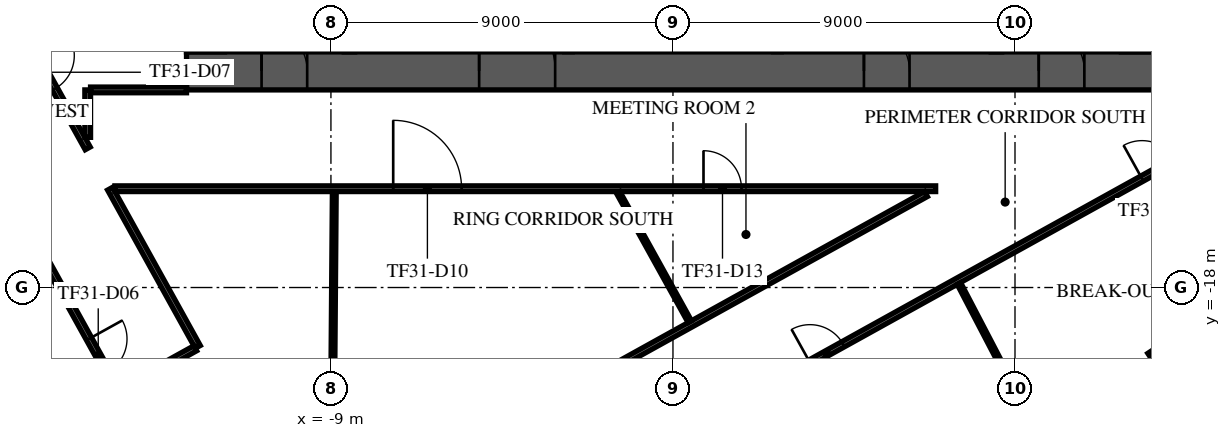
"""IFC4 building model, lengths in metres.
Left out: names, types, materials, properties, quantities, classifications, styles, units other than length and angle.
Written with IfcOpenShell. Run it as: python <this file> out.ifc"""

import sys

from ifc_helpers import new_model, si_unit, direction, frame, frame_2d, origin, origin_2d, place, context, subcontext, project, spatial, rectangle, extrude, element, fill, save


model = new_model("IFC4")
c1 = context("Model", 3, precision=1e-05, world=origin(), true_north=direction((0.0, 1.0)))
c2 = subcontext(c1, "Body", "Model", "MODEL_VIEW")
j1 = project(units=[si_unit("LENGTHUNIT", "METRE"), si_unit("PLANEANGLEUNIT", "RADIAN")], contexts=[c1])
p1 = place(None, origin())
s1 = spatial("IfcSite", under=j1, at=p1, CompositionType="ELEMENT")
p2 = place(p1, origin())
s2 = spatial("IfcBuilding", under=s1, at=p2, CompositionType="ELEMENT")
p3 = place(p2, frame((0.0, 0.0, 135.7)))
s3 = spatial("IfcBuildingStorey", under=s2, at=p3, CompositionType="ELEMENT", Elevation=135.7)
p4 = place(p3, frame((13.258, -19.885, -0.4), z_axis=(0.0, 0.0, 1.0), x_axis=(0.832028680356, 0.55473261583, 0.0)))
e1 = element("IfcColumn", 1, at=p4, inside=s3, PredefinedType="COLUMN", context=c2, shape_type="SweptSolid", body=[
    extrude(rectangle(XDim=1.1, YDim=1.1, at=origin_2d()), origin(), (0.0, 0.0, 1.0), 4.4),
])
p5 = place(p3, frame((-12.8, -12.3, 0.0), z_axis=(0.0, 0.0, 1.0), x_axis=(1.0, 0.0, 0.0)))
e2 = element("IfcWall", 2, at=p5, inside=s3, PredefinedType="SHEAR", context=c2, shape_type="SweptSolid", body=[
    extrude(rectangle(XDim=25.6, YDim=1.0, at=frame_2d((12.8, 0.0))), origin(), (0.0, 0.0, 1.0), 3.6),
])
p6 = place(p5, frame((7.7, 0.0, 0.0)))
e3 = element("IfcOpeningElement", 3, at=p6, cuts=e2, PredefinedType="OPENING", context=c2, shape_type="SweptSolid", body=[
    extrude(rectangle(XDim=2.0, YDim=2.1, at=frame_2d((1.0, 1.05))), frame((0.0, 0.51, 0.0), z_axis=(0.0, -1.0, 0.0), x_axis=(1.0, 0.0, 0.0)), (0.0, 0.0, 1.0), 1.02),
])
p7 = place(p5, frame((17.825, 0.0, 0.0)))
e4 = element("IfcOpeningElement", 4, at=p7, cuts=e2, PredefinedType="OPENING", context=c2, shape_type="SweptSolid", body=[
    extrude(rectangle(XDim=1.2, YDim=2.1, at=frame_2d((0.6, 1.05))), frame((0.0, 0.51, 0.0), z_axis=(0.0, -1.0, 0.0), x_axis=(1.0, 0.0, 0.0)), (0.0, 0.0, 1.0), 1.02),
])
p8 = place(p5, frame((1.975, 0.0, 0.0)))
e5 = element("IfcOpeningElement", 5, at=p8, cuts=e2, PredefinedType="OPENING", context=c2, shape_type="SweptSolid", body=[
    extrude(rectangle(XDim=1.2, YDim=2.1, at=frame_2d((0.6, 1.05))), frame((0.0, 0.51, 0.0), z_axis=(0.0, -1.0, 0.0), x_axis=(1.0, 0.0, 0.0)), (0.0, 0.0, 1.0), 1.02),
])
p9 = place(p5, frame((22.425, 0.0, 0.0)))
e6 = element("IfcOpeningElement", 6, at=p9, cuts=e2, PredefinedType="OPENING", context=c2, shape_type="SweptSolid", body=[
    extrude(rectangle(XDim=1.2, YDim=2.1, at=frame_2d((0.6, 1.05))), frame((0.0, 0.51, 0.0), z_axis=(0.0, -1.0, 0.0), x_axis=(1.0, 0.0, 0.0)), (0.0, 0.0, 1.0), 1.02),
])
p10 = place(p3, frame((-36.291, 4.209, 0.0), z_axis=(0.0, 0.0, 1.0), x_axis=(0.484810659622, -0.874619131003, 0.0)))
e7 = element("IfcWall", 7, at=p10, inside=s3, PredefinedType="STANDARD", context=c2, shape_type="SweptSolid", body=[
    extrude(rectangle(XDim=42.552, YDim=0.6, at=frame_2d((21.276, 0.0))), origin(), (0.0, 0.0, 1.0), 3.6),
])
p11 = place(p10, frame((1.178, 0.0, 0.9)))
e8 = element("IfcOpeningElement", 8, at=p11, cuts=e7, PredefinedType="OPENING", context=c2, shape_type="SweptSolid", body=[
    extrude(rectangle(XDim=1.8, YDim=2.1, at=frame_2d((0.9, 1.05))), frame((0.0, 0.31, 0.0), z_axis=(0.0, -1.0, 0.0), x_axis=(1.0, 0.0, 0.0)), (0.0, 0.0, 1.0), 0.62),
])
p12 = place(p10, frame((5.396, 0.0, 0.9)))
e9 = element("IfcOpeningElement", 9, at=p12, cuts=e7, PredefinedType="OPENING", context=c2, shape_type="SweptSolid", body=[
    extrude(rectangle(XDim=1.8, YDim=2.1, at=frame_2d((0.9, 1.05))), frame((0.0, 0.31, 0.0), z_axis=(0.0, -1.0, 0.0), x_axis=(1.0, 0.0, 0.0)), (0.0, 0.0, 1.0), 0.62),
])
p13 = place(p10, frame((13.956, 0.0, 0.9)))
e10 = element("IfcOpeningElement", 10, at=p13, cuts=e7, PredefinedType="OPENING", context=c2, shape_type="SweptSolid", body=[
    extrude(rectangle(XDim=1.8, YDim=2.1, at=frame_2d((0.9, 1.05))), frame((0.0, 0.31, 0.0), z_axis=(0.0, -1.0, 0.0), x_axis=(1.0, 0.0, 0.0)), (0.0, 0.0, 1.0), 0.62),
])
p14 = place(p10, frame((18.236, 0.0, 0.9)))
e11 = element("IfcOpeningElement", 11, at=p14, cuts=e7, PredefinedType="OPENING", context=c2, shape_type="SweptSolid", body=[
    extrude(rectangle(XDim=1.8, YDim=2.1, at=frame_2d((0.9, 1.05))), frame((0.0, 0.31, 0.0), z_axis=(0.0, -1.0, 0.0), x_axis=(1.0, 0.0, 0.0)), (0.0, 0.0, 1.0), 0.62),
])
p15 = place(p10, frame((22.516, 0.0, 0.9)))
e12 = element("IfcOpeningElement", 12, at=p15, cuts=e7, PredefinedType="OPENING", context=c2, shape_type="SweptSolid", body=[
    extrude(rectangle(XDim=1.8, YDim=2.1, at=frame_2d((0.9, 1.05))), frame((0.0, 0.31, 0.0), z_axis=(0.0, -1.0, 0.0), x_axis=(1.0, 0.0, 0.0)), (0.0, 0.0, 1.0), 0.62),
])
p16 = place(p10, frame((26.796, 0.0, 0.9)))
e13 = element("IfcOpeningElement", 13, at=p16, cuts=e7, PredefinedType="OPENING", context=c2, shape_type="SweptSolid", body=[
    extrude(rectangle(XDim=1.8, YDim=2.1, at=frame_2d((0.9, 1.05))), frame((0.0, 0.31, 0.0), z_axis=(0.0, -1.0, 0.0), x_axis=(1.0, 0.0, 0.0)), (0.0, 0.0, 1.0), 0.62),
])
p17 = place(p10, frame((31.076, 0.0, 0.9)))
e14 = element("IfcOpeningElement", 14, at=p17, cuts=e7, PredefinedType="OPENING", context=c2, shape_type="SweptSolid", body=[
    extrude(rectangle(XDim=1.8, YDim=2.1, at=frame_2d((0.9, 1.05))), frame((0.0, 0.31, 0.0), z_axis=(0.0, -1.0, 0.0), x_axis=(1.0, 0.0, 0.0)), (0.0, 0.0, 1.0), 0.62),
])
p18 = place(p10, frame((35.356, 0.0, 0.9)))
e15 = element("IfcOpeningElement", 15, at=p18, cuts=e7, PredefinedType="OPENING", context=c2, shape_type="SweptSolid", body=[
    extrude(rectangle(XDim=1.8, YDim=2.1, at=frame_2d((0.9, 1.05))), frame((0.0, 0.31, 0.0), z_axis=(0.0, -1.0, 0.0), x_axis=(1.0, 0.0, 0.0)), (0.0, 0.0, 1.0), 0.62),
])
p19 = place(p10, frame((39.573, 0.0, 0.9)))
e16 = element("IfcOpeningElement", 16, at=p19, cuts=e7, PredefinedType="OPENING", context=c2, shape_type="SweptSolid", body=[
    extrude(rectangle(XDim=1.8, YDim=2.1, at=frame_2d((0.9, 1.05))), frame((0.0, 0.31, 0.0), z_axis=(0.0, -1.0, 0.0), x_axis=(1.0, 0.0, 0.0)), (0.0, 0.0, 1.0), 0.62),
])
p20 = place(p3, frame((-9.103, -34.888, 0.0), z_axis=(0.0, 0.0, 1.0), x_axis=(0.874618897425, 0.484811081007, 0.0)))
e17 = element("IfcWall", 17, at=p20, inside=s3, PredefinedType="STANDARD", context=c2, shape_type="SweptSolid", body=[
    extrude(rectangle(XDim=49.751, YDim=0.6, at=frame_2d((24.876, 0.0))), origin(), (0.0, 0.0, 1.0), 3.6),
])
p21 = place(p20, frame((1.161, 0.0, 0.9)))
e18 = element("IfcOpeningElement", 18, at=p21, cuts=e17, PredefinedType="OPENING", context=c2, shape_type="SweptSolid", body=[
    extrude(rectangle(XDim=2.1, YDim=2.1, at=frame_2d((1.05, 1.05))), frame((0.0, 0.31, 0.0), z_axis=(0.0, -1.0, 0.0), x_axis=(1.0, 0.0, 0.0)), (0.0, 0.0, 1.0), 0.62),
])
p22 = place(p20, frame((5.644, 0.0, 0.9)))
e19 = element("IfcOpeningElement", 19, at=p22, cuts=e17, PredefinedType="OPENING", context=c2, shape_type="SweptSolid", body=[
    extrude(rectangle(XDim=2.1, YDim=2.1, at=frame_2d((1.05, 1.05))), frame((0.0, 0.31, 0.0), z_axis=(0.0, -1.0, 0.0), x_axis=(1.0, 0.0, 0.0)), (0.0, 0.0, 1.0), 0.62),
])
p23 = place(p20, frame((10.189, 0.0, 0.9)))
e20 = element("IfcOpeningElement", 20, at=p23, cuts=e17, PredefinedType="OPENING", context=c2, shape_type="SweptSolid", body=[
    extrude(rectangle(XDim=2.1, YDim=2.1, at=frame_2d((1.05, 1.05))), frame((0.0, 0.31, 0.0), z_axis=(0.0, -1.0, 0.0), x_axis=(1.0, 0.0, 0.0)), (0.0, 0.0, 1.0), 0.62),
])
p24 = place(p20, frame((14.735, 0.0, 0.9)))
e21 = element("IfcOpeningElement", 21, at=p24, cuts=e17, PredefinedType="OPENING", context=c2, shape_type="SweptSolid", body=[
    extrude(rectangle(XDim=2.1, YDim=2.1, at=frame_2d((1.05, 1.05))), frame((0.0, 0.31, 0.0), z_axis=(0.0, -1.0, 0.0), x_axis=(1.0, 0.0, 0.0)), (0.0, 0.0, 1.0), 0.62),
])
p25 = place(p20, frame((19.28, 0.0, 0.9)))
e22 = element("IfcOpeningElement", 22, at=p25, cuts=e17, PredefinedType="OPENING", context=c2, shape_type="SweptSolid", body=[
    extrude(rectangle(XDim=2.1, YDim=2.1, at=frame_2d((1.05, 1.05))), frame((0.0, 0.31, 0.0), z_axis=(0.0, -1.0, 0.0), x_axis=(1.0, 0.0, 0.0)), (0.0, 0.0, 1.0), 0.62),
])
p26 = place(p20, frame((23.826, 0.0, 0.9)))
e23 = element("IfcOpeningElement", 23, at=p26, cuts=e17, PredefinedType="OPENING", context=c2, shape_type="SweptSolid", body=[
    extrude(rectangle(XDim=2.1, YDim=2.1, at=frame_2d((1.05, 1.05))), frame((0.0, 0.31, 0.0), z_axis=(0.0, -1.0, 0.0), x_axis=(1.0, 0.0, 0.0)), (0.0, 0.0, 1.0), 0.62),
])
p27 = place(p20, frame((28.371, 0.0, 0.9)))
e24 = element("IfcOpeningElement", 24, at=p27, cuts=e17, PredefinedType="OPENING", context=c2, shape_type="SweptSolid", body=[
    extrude(rectangle(XDim=2.1, YDim=2.1, at=frame_2d((1.05, 1.05))), frame((0.0, 0.31, 0.0), z_axis=(0.0, -1.0, 0.0), x_axis=(1.0, 0.0, 0.0)), (0.0, 0.0, 1.0), 0.62),
])
p28 = place(p20, frame((32.917, 0.0, 0.9)))
e25 = element("IfcOpeningElement", 25, at=p28, cuts=e17, PredefinedType="OPENING", context=c2, shape_type="SweptSolid", body=[
    extrude(rectangle(XDim=2.1, YDim=2.1, at=frame_2d((1.05, 1.05))), frame((0.0, 0.31, 0.0), z_axis=(0.0, -1.0, 0.0), x_axis=(1.0, 0.0, 0.0)), (0.0, 0.0, 1.0), 0.62),
])
p29 = place(p20, frame((37.462, 0.0, 0.9)))
e26 = element("IfcOpeningElement", 26, at=p29, cuts=e17, PredefinedType="OPENING", context=c2, shape_type="SweptSolid", body=[
    extrude(rectangle(XDim=2.1, YDim=2.1, at=frame_2d((1.05, 1.05))), frame((0.0, 0.31, 0.0), z_axis=(0.0, -1.0, 0.0), x_axis=(1.0, 0.0, 0.0)), (0.0, 0.0, 1.0), 0.62),
])
p30 = place(p20, frame((42.008, 0.0, 0.9)))
e27 = element("IfcOpeningElement", 27, at=p30, cuts=e17, PredefinedType="OPENING", context=c2, shape_type="SweptSolid", body=[
    extrude(rectangle(XDim=2.1, YDim=2.1, at=frame_2d((1.05, 1.05))), frame((0.0, 0.31, 0.0), z_axis=(0.0, -1.0, 0.0), x_axis=(1.0, 0.0, 0.0)), (0.0, 0.0, 1.0), 0.62),
])
p31 = place(p20, frame((46.491, 0.0, 0.9)))
e28 = element("IfcOpeningElement", 28, at=p31, cuts=e17, PredefinedType="OPENING", context=c2, shape_type="SweptSolid", body=[
    extrude(rectangle(XDim=2.1, YDim=2.1, at=frame_2d((1.05, 1.05))), frame((0.0, 0.31, 0.0), z_axis=(0.0, -1.0, 0.0), x_axis=(1.0, 0.0, 0.0)), (0.0, 0.0, 1.0), 0.62),
])
p32 = place(p3, frame((-25.279, -1.467, 0.0), z_axis=(0.0, 0.0, 1.0), x_axis=(0.484803020703, -0.874623365294, 0.0)))
e29 = element("IfcWall", 29, at=p32, inside=s3, PredefinedType="PARTITIONING", context=c2, shape_type="SweptSolid", body=[
    extrude(rectangle(XDim=22.02, YDim=0.15, at=frame_2d((11.01, 0.0))), origin(), (0.0, 0.0, 1.0), 3.15),
])
p33 = place(p32, frame((6.3, 0.0, 0.0)))
e30 = element("IfcOpeningElement", 30, at=p33, cuts=e29, PredefinedType="OPENING", context=c2, shape_type="SweptSolid", body=[
    extrude(rectangle(XDim=1.8, YDim=2.1, at=frame_2d((0.9, 1.05))), frame((0.0, 0.085, 0.0), z_axis=(0.0, -1.0, 0.0), x_axis=(1.0, 0.0, 0.0)), (0.0, 0.0, 1.0), 0.17),
])
p34 = place(p32, frame((9.948, 0.0, 0.0)))
e31 = element("IfcOpeningElement", 31, at=p34, cuts=e29, PredefinedType="OPENING", context=c2, shape_type="SweptSolid", body=[
    extrude(rectangle(XDim=1.8, YDim=2.1, at=frame_2d((0.9, 1.05))), frame((0.0, 0.085, 0.0), z_axis=(0.0, -1.0, 0.0), x_axis=(1.0, 0.0, 0.0)), (0.0, 0.0, 1.0), 0.17),
])
p35 = place(p32, frame((20.448, 0.0, 0.0)))
e32 = element("IfcOpeningElement", 32, at=p35, cuts=e29, PredefinedType="OPENING", context=c2, shape_type="SweptSolid", body=[
    extrude(rectangle(XDim=1.0, YDim=2.1, at=frame_2d((0.5, 1.05))), frame((0.0, 0.085, 0.0), z_axis=(0.0, -1.0, 0.0), x_axis=(1.0, 0.0, 0.0)), (0.0, 0.0, 1.0), 0.17),
])
p36 = place(p3, frame((-18.959, -7.918, 0.0), z_axis=(0.0, 0.0, 1.0), x_axis=(0.484857684507, -0.874593062958, 0.0)))
e33 = element("IfcWall", 33, at=p36, inside=s3, PredefinedType="PARTITIONING", context=c2, shape_type="SweptSolid", body=[
    extrude(rectangle(XDim=7.341, YDim=0.15, at=frame_2d((3.67, 0.0))), origin(), (0.0, 0.0, 1.0), 3.15),
])
p37 = place(p36, frame((4.55, 0.0, 0.0)))
e34 = element("IfcOpeningElement", 34, at=p37, cuts=e33, PredefinedType="OPENING", context=c2, shape_type="SweptSolid", body=[
    extrude(rectangle(XDim=1.0, YDim=2.1, at=frame_2d((0.5, 1.05))), frame((0.0, 0.085, 0.0), z_axis=(0.0, -1.0, 0.0), x_axis=(1.0, 0.0, 0.0)), (0.0, 0.0, 1.0), 0.17),
])
p38 = place(p3, frame((-15.4, -14.048, 0.0), z_axis=(0.0, 0.0, 1.0), x_axis=(0.0, 1.0, 0.0)))
e35 = element("IfcWall", 35, at=p38, inside=s3, PredefinedType="PARTITIONING", context=c2, shape_type="SweptSolid", body=[
    extrude(rectangle(XDim=1.248, YDim=0.15, at=frame_2d((0.624, 0.0))), origin(), (0.0, 0.0, 1.0), 3.15),
])
p39 = place(p3, frame((-15.325, -12.8, 0.0), z_axis=(0.0, 0.0, 1.0), x_axis=(1.0, 0.0, 0.0)))
e36 = element("IfcWall", 36, at=p39, inside=s3, PredefinedType="PARTITIONING", context=c2, shape_type="SweptSolid", body=[
    extrude(rectangle(XDim=2.525, YDim=0.15, at=frame_2d((1.262, 0.0))), origin(), (0.0, 0.0, 1.0), 3.03),
])
p40 = place(p3, frame((-14.811, -15.4, 0.0), z_axis=(0.0, 0.0, 1.0), x_axis=(0.484728084089, -0.874664898401, 0.0)))
e37 = element("IfcWall", 37, at=p40, inside=s3, PredefinedType="PARTITIONING", context=c2, shape_type="SweptSolid", body=[
    extrude(rectangle(XDim=4.76, YDim=0.15, at=frame_2d((2.38, 0.0))), origin(), (0.0, 0.0, 1.0), 3.15),
])
p41 = place(p3, frame((-14.684, -15.4, 0.0), z_axis=(0.0, 0.0, 1.0), x_axis=(1.0, 0.0, 0.0)))
e38 = element("IfcWall", 38, at=p41, inside=s3, PredefinedType="PARTITIONING", context=c2, shape_type="SweptSolid", body=[
    extrude(rectangle(XDim=21.596, YDim=0.15, at=frame_2d((10.798, 0.0))), origin(), (0.0, 0.0, 1.0), 3.15),
])
p42 = place(p41, frame((7.322, 0.0, 0.0)))
e39 = element("IfcOpeningElement", 39, at=p42, cuts=e38, PredefinedType="OPENING", context=c2, shape_type="SweptSolid", body=[
    extrude(rectangle(XDim=1.8, YDim=2.1, at=frame_2d((0.9, 1.05))), frame((0.0, 0.085, 0.0), z_axis=(0.0, -1.0, 0.0), x_axis=(1.0, 0.0, 0.0)), (0.0, 0.0, 1.0), 0.17),
])
p43 = place(p41, frame((15.487, 0.0, 0.0)))
e40 = element("IfcOpeningElement", 40, at=p43, cuts=e38, PredefinedType="OPENING", context=c2, shape_type="SweptSolid", body=[
    extrude(rectangle(XDim=1.0, YDim=2.1, at=frame_2d((0.5, 1.05))), frame((0.0, 0.085, 0.0), z_axis=(0.0, -1.0, 0.0), x_axis=(1.0, 0.0, 0.0)), (0.0, 0.0, 1.0), 0.17),
])
p44 = place(p3, frame((-14.537, -20.69, 0.0), z_axis=(0.0, 0.0, 1.0), x_axis=(0.874699347934, 0.48466591661, 0.0)))
e41 = element("IfcWall", 41, at=p44, inside=s3, PredefinedType="PARTITIONING", context=c2, shape_type="SweptSolid", body=[
    extrude(rectangle(XDim=2.25, YDim=0.15, at=frame_2d((1.125, 0.0))), origin(), (0.0, 0.0, 1.0), 3.15),
])
p45 = place(p3, frame((-5.714, -22.399, 0.0), z_axis=(0.0, 0.0, 1.0), x_axis=(0.874614395079, 0.484819203334, 0.0)))
e42 = element("IfcWall", 42, at=p45, inside=s3, PredefinedType="PARTITIONING", context=c2, shape_type="SweptSolid", body=[
    extrude(rectangle(XDim=14.146, YDim=0.15, at=frame_2d((7.073, 0.0))), origin(), (0.0, 0.0, 1.0), 3.15),
])
p46 = place(p45, frame((3.05, 0.0, 0.0)))
e43 = element("IfcOpeningElement", 43, at=p46, cuts=e42, PredefinedType="OPENING", context=c2, shape_type="SweptSolid", body=[
    extrude(rectangle(XDim=1.0, YDim=2.1, at=frame_2d((0.5, 1.05))), frame((0.0, 0.085, 0.0), z_axis=(0.0, -1.0, 0.0), x_axis=(1.0, 0.0, 0.0)), (0.0, 0.0, 1.0), 0.17),
])
p47 = place(p3, frame((-4.484, -24.462, 0.0), z_axis=(0.0, 0.0, 1.0), x_axis=(0.874618059696, 0.484812592301, 0.0)))
e44 = element("IfcWall", 44, at=p47, inside=s3, PredefinedType="PARTITIONING", context=c2, shape_type="SweptSolid", body=[
    extrude(rectangle(XDim=31.638, YDim=0.15, at=frame_2d((15.819, 0.0))), origin(), (0.0, 0.0, 1.0), 3.15),
])
p48 = place(p47, frame((9.25, 0.0, 0.0)))
e45 = element("IfcOpeningElement", 45, at=p48, cuts=e44, PredefinedType="OPENING", context=c2, shape_type="SweptSolid", body=[
    extrude(rectangle(XDim=1.0, YDim=2.1, at=frame_2d((0.5, 1.05))), frame((0.0, 0.085, 0.0), z_axis=(0.0, -1.0, 0.0), x_axis=(1.0, 0.0, 0.0)), (0.0, 0.0, 1.0), 0.17),
])
p49 = place(p47, frame((19.239, 0.0, 0.0)))
e46 = element("IfcOpeningElement", 46, at=p49, cuts=e44, PredefinedType="OPENING", context=c2, shape_type="SweptSolid", body=[
    extrude(rectangle(XDim=1.0, YDim=2.1, at=frame_2d((0.5, 1.05))), frame((0.0, 0.085, 0.0), z_axis=(0.0, -1.0, 0.0), x_axis=(1.0, 0.0, 0.0)), (0.0, 0.0, 1.0), 0.17),
])
p50 = place(p47, frame((24.772, 0.0, 0.0)))
e47 = element("IfcOpeningElement", 47, at=p50, cuts=e44, PredefinedType="OPENING", context=c2, shape_type="SweptSolid", body=[
    extrude(rectangle(XDim=1.0, YDim=2.1, at=frame_2d((0.5, 1.05))), frame((0.0, 0.085, 0.0), z_axis=(0.0, -1.0, 0.0), x_axis=(1.0, 0.0, 0.0)), (0.0, 0.0, 1.0), 0.17),
])
p51 = place(p3, frame((-9.023, -29.637, 0.0), z_axis=(0.0, 0.0, 1.0), x_axis=(0.007843639619, 0.999969238186, 0.0)))
e48 = element("IfcWall", 48, at=p51, inside=s3, PredefinedType="PARTITIONING", context=c2, shape_type="SweptSolid", body=[
    extrude(rectangle(XDim=14.162, YDim=0.1, at=frame_2d((7.081, 0.0))), origin(), (0.0, 0.0, 1.0), 3.15),
])
p52 = place(p3, frame((-1.441, -15.499, 0.0), z_axis=(0.0, 0.0, 1.0), x_axis=(0.484661708709, -0.874701679495, 0.0)))
e49 = element("IfcWall", 49, at=p52, inside=s3, PredefinedType="PARTITIONING", context=c2, shape_type="SweptSolid", body=[
    extrude(rectangle(XDim=3.888, YDim=0.1, at=frame_2d((1.944, 0.0))), origin(), (0.0, 0.0, 1.0), 3.6),
])
p53 = place(p3, frame((7.524, -17.893, 0.0), z_axis=(0.0, 0.0, 1.0), x_axis=(0.462569855846, -0.886582837902, 0.0)))
e50 = element("IfcWall", 50, at=p53, inside=s3, PredefinedType="PARTITIONING", context=c2, shape_type="SweptSolid", body=[
    extrude(rectangle(XDim=6.503, YDim=0.1, at=frame_2d((3.251, 0.0))), origin(), (0.0, 0.0, 1.0), 3.15),
])
p54 = place(p6, origin())
e51 = element("IfcDoor", 51, at=p54, inside=s3, OperationType="SINGLE_SWING_LEFT", PredefinedType="DOOR", context=c2, shape_type="SweptSolid", body=[
    extrude(rectangle(XDim=2.0, YDim=2.1, at=frame_2d((1.0, 1.05))), frame((0.0, 0.025, 0.0), z_axis=(0.0, -1.0, 0.0), x_axis=(1.0, 0.0, 0.0)), (0.0, 0.0, 1.0), 0.05),
])
fill(e3, e51)
p55 = place(p7, origin())
e52 = element("IfcDoor", 52, at=p55, inside=s3, OperationType="SINGLE_SWING_LEFT", PredefinedType="DOOR", context=c2, shape_type="SweptSolid", body=[
    extrude(rectangle(XDim=1.2, YDim=2.1, at=frame_2d((0.6, 1.05))), frame((0.0, 0.025, 0.0), z_axis=(0.0, -1.0, 0.0), x_axis=(1.0, 0.0, 0.0)), (0.0, 0.0, 1.0), 0.05),
])
fill(e4, e52)
p56 = place(p8, origin())
e53 = element("IfcDoor", 53, at=p56, inside=s3, OperationType="SINGLE_SWING_LEFT", PredefinedType="DOOR", context=c2, shape_type="SweptSolid", body=[
    extrude(rectangle(XDim=1.2, YDim=2.1, at=frame_2d((0.6, 1.05))), frame((0.0, 0.025, 0.0), z_axis=(0.0, -1.0, 0.0), x_axis=(1.0, 0.0, 0.0)), (0.0, 0.0, 1.0), 0.05),
])
fill(e5, e53)
p57 = place(p9, origin())
e54 = element("IfcDoor", 54, at=p57, inside=s3, OperationType="SINGLE_SWING_LEFT", PredefinedType="DOOR", context=c2, shape_type="SweptSolid", body=[
    extrude(rectangle(XDim=1.2, YDim=2.1, at=frame_2d((0.6, 1.05))), frame((0.0, 0.025, 0.0), z_axis=(0.0, -1.0, 0.0), x_axis=(1.0, 0.0, 0.0)), (0.0, 0.0, 1.0), 0.05),
])
fill(e6, e54)
p58 = place(p35, frame((1.0, 0.0, 0.0), z_axis=(0.0, 0.0, 1.0), x_axis=(-1.0, 0.0, 0.0)))
e55 = element("IfcDoor", 55, at=p58, inside=s3, OperationType="SINGLE_SWING_LEFT", PredefinedType="DOOR", context=c2, shape_type="SweptSolid", body=[
    extrude(rectangle(XDim=1.0, YDim=2.1, at=frame_2d((0.5, 1.05))), frame((0.0, 0.025, 0.0), z_axis=(0.0, -1.0, 0.0), x_axis=(1.0, 0.0, 0.0)), (0.0, 0.0, 1.0), 0.05),
])
fill(e32, e55)
p59 = place(p37, origin())
e56 = element("IfcDoor", 56, at=p59, inside=s3, OperationType="SINGLE_SWING_LEFT", PredefinedType="DOOR", context=c2, shape_type="SweptSolid", body=[
    extrude(rectangle(XDim=1.0, YDim=2.1, at=frame_2d((0.5, 1.05))), frame((0.0, 0.025, 0.0), z_axis=(0.0, -1.0, 0.0), x_axis=(1.0, 0.0, 0.0)), (0.0, 0.0, 1.0), 0.05),
])
fill(e34, e56)
p60 = place(p42, frame((1.8, 0.0, 0.0), z_axis=(0.0, 0.0, 1.0), x_axis=(-1.0, 0.0, 0.0)))
e57 = element("IfcDoor", 57, at=p60, inside=s3, OperationType="DOUBLE_DOOR_SINGLE_SWING", PredefinedType="DOOR", context=c2, shape_type="SweptSolid", body=[
    extrude(rectangle(XDim=1.8, YDim=2.1, at=frame_2d((0.9, 1.05))), frame((0.0, 0.025, 0.0), z_axis=(0.0, -1.0, 0.0), x_axis=(1.0, 0.0, 0.0)), (0.0, 0.0, 1.0), 0.05),
])
fill(e39, e57)
p61 = place(p43, frame((1.0, 0.0, 0.0), z_axis=(0.0, 0.0, 1.0), x_axis=(-1.0, 0.0, 0.0)))
e58 = element("IfcDoor", 58, at=p61, inside=s3, OperationType="SINGLE_SWING_LEFT", PredefinedType="DOOR", context=c2, shape_type="SweptSolid", body=[
    extrude(rectangle(XDim=1.0, YDim=2.1, at=frame_2d((0.5, 1.05))), frame((0.0, 0.025, 0.0), z_axis=(0.0, -1.0, 0.0), x_axis=(1.0, 0.0, 0.0)), (0.0, 0.0, 1.0), 0.05),
])
fill(e40, e58)
p62 = place(p48, frame((1.0, 0.0, 0.0), z_axis=(0.0, 0.0, 1.0), x_axis=(-1.0, 0.0, 0.0)))
e59 = element("IfcDoor", 59, at=p62, inside=s3, OperationType="SINGLE_SWING_RIGHT", PredefinedType="DOOR", context=c2, shape_type="SweptSolid", body=[
    extrude(rectangle(XDim=1.0, YDim=2.1, at=frame_2d((0.5, 1.05))), frame((0.0, 0.025, 0.0), z_axis=(0.0, -1.0, 0.0), x_axis=(1.0, 0.0, 0.0)), (0.0, 0.0, 1.0), 0.05),
])
fill(e45, e59)
p63 = place(p49, frame((1.0, 0.0, 0.0), z_axis=(0.0, 0.0, 1.0), x_axis=(-1.0, 0.0, 0.0)))
e60 = element("IfcDoor", 60, at=p63, inside=s3, OperationType="SINGLE_SWING_RIGHT", PredefinedType="DOOR", context=c2, shape_type="SweptSolid", body=[
    extrude(rectangle(XDim=1.0, YDim=2.1, at=frame_2d((0.5, 1.05))), frame((0.0, 0.025, 0.0), z_axis=(0.0, -1.0, 0.0), x_axis=(1.0, 0.0, 0.0)), (0.0, 0.0, 1.0), 0.05),
])
fill(e46, e60)
save(model, sys.argv[1])
